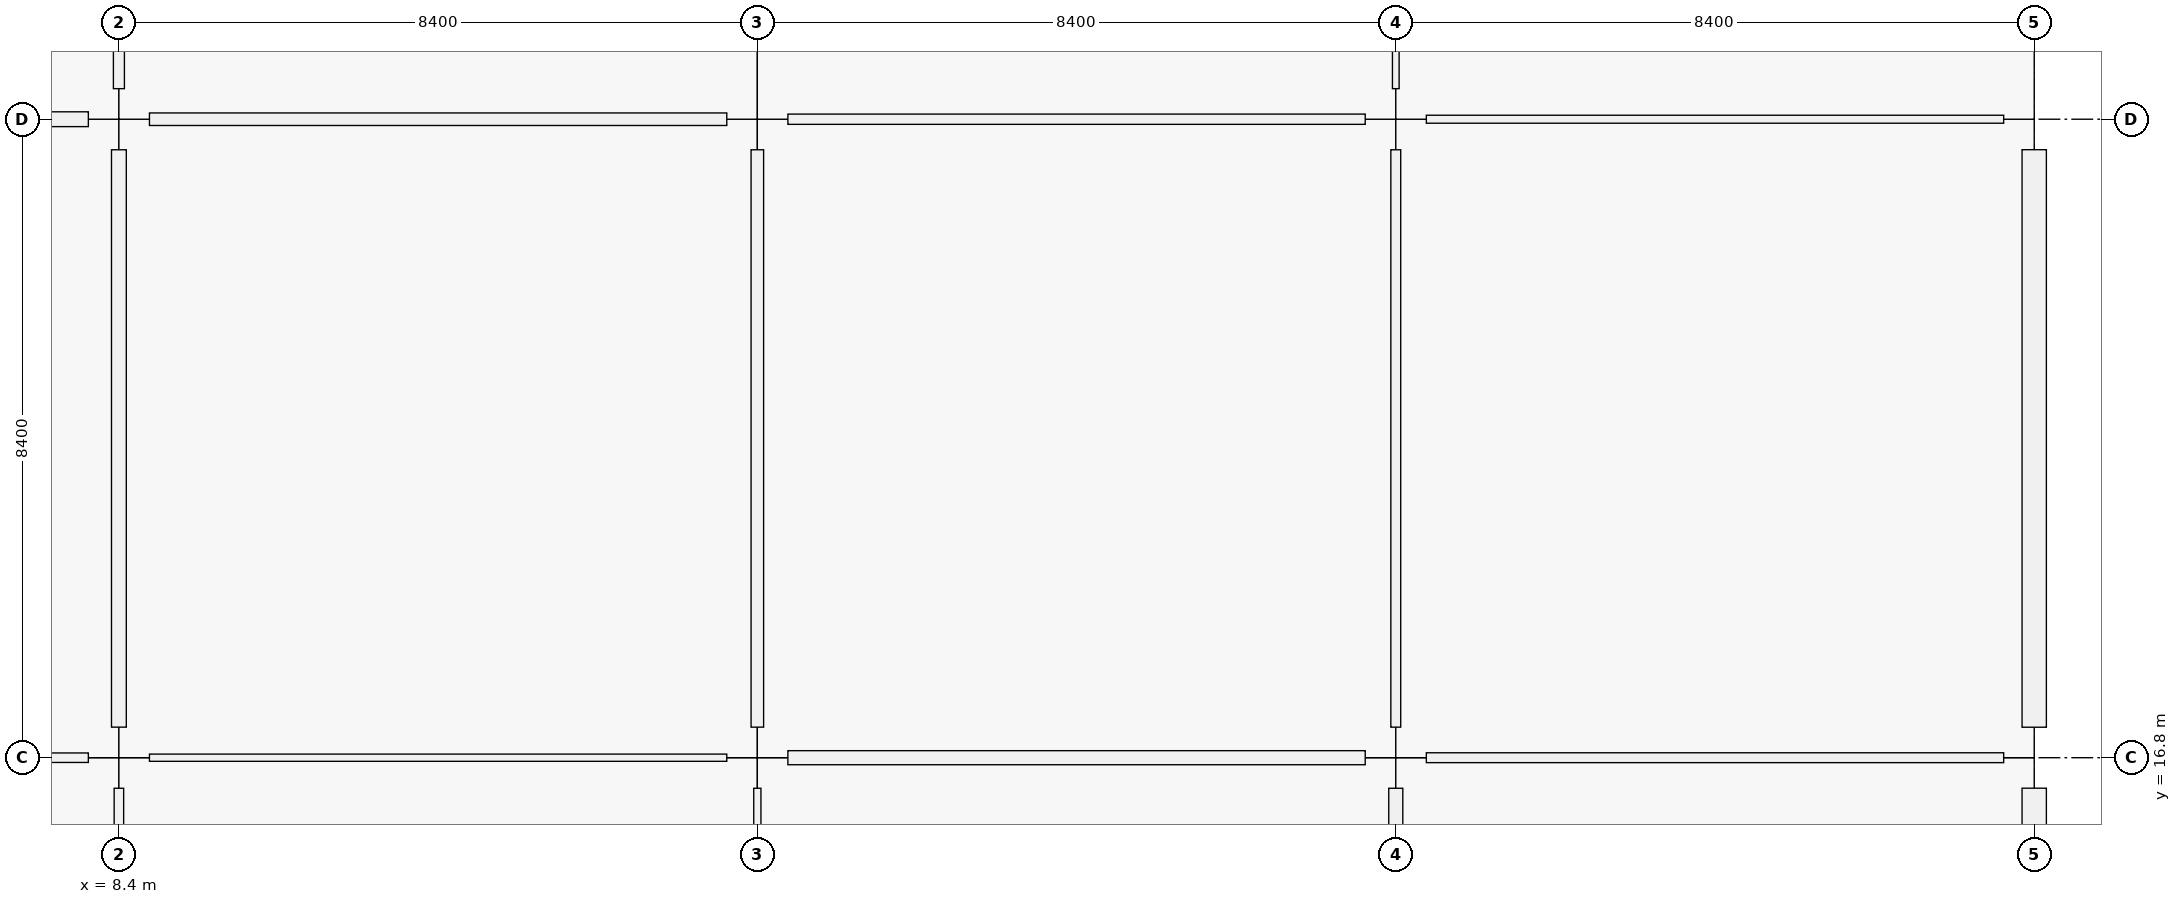
"""IFC4 building model, lengths in metres.
Left out: names, types, materials, properties, quantities, classifications, styles, units other than length and angle.
Written with IfcOpenShell. Run it as: python <this file> out.ifc"""

import sys

from ifc_helpers import new_model, si_unit, direction, frame, frame_2d, origin, origin_2d, place, context, subcontext, project, spatial, rectangle, extrude, element, fill, save


model = new_model("IFC4")
c1 = context("Model", 3, precision=1e-05, world=origin(), true_north=direction((0.0, 1.0)))
c2 = subcontext(c1, "Body", "Model", "MODEL_VIEW")
j1 = project(units=[si_unit("LENGTHUNIT", "METRE"), si_unit("PLANEANGLEUNIT", "RADIAN")], contexts=[c1])
p1 = place(None, origin())
s1 = spatial("IfcSite", under=j1, at=p1, CompositionType="ELEMENT")
p2 = place(p1, origin())
s2 = spatial("IfcBuilding", under=s1, at=p2, CompositionType="ELEMENT")
p3 = place(p2, frame((0.0, 0.0, 5.76)))
s3 = spatial("IfcBuildingStorey", under=s2, at=p3, CompositionType="ELEMENT", Elevation=5.76)
for number, where, z_axis, x_axis in (
    (1, (8.4, 16.8, 0.0), (0.0, 0.0, 1.0), (1.0, 0.0, 0.0)),
    (2, (8.4, 25.2, 0.0), (0.0, 0.0, 1.0), (1.0, 0.0, 0.0)),
    (3, (16.8, 16.8, 0.0), (0.0, 0.0, 1.0), (1.0, 0.0, 0.0)),
    (4, (16.8, 25.2, 0.0), (0.0, 0.0, 1.0), (1.0, 0.0, 0.0)),
    (5, (25.2, 16.8, 0.0), (0.0, 0.0, 1.0), (1.0, 0.0, 0.0)),
    (6, (25.2, 25.2, 0.0), (0.0, 0.0, 1.0), (1.0, 0.0, 0.0)),
    (7, (33.6, 16.8, 0.0), (0.0, 0.0, 1.0), (1.0, 0.0, 0.0)),
    (8, (33.6, 25.2, 0.0), (0.0, 0.0, 1.0), (1.0, 0.0, 0.0)),
):
    element("IfcColumn", number, at=place(p3, frame(where, z_axis=z_axis, x_axis=x_axis)), inside=s3, PredefinedType="COLUMN", context=c2, shape_type="SweptSolid", body=[
        extrude(rectangle(XDim=0.8, YDim=0.8, at=origin_2d()), origin(), (0.0, 0.0, 1.0), 4.5),
    ])
p4 = place(p3, frame((33.6, 16.399, 0.0), z_axis=(0.0, 0.0, 1.0), x_axis=(0.0, -1.0, 0.0)))
e9 = element("IfcWall", 9, at=p4, inside=s3, PredefinedType="SOLIDWALL", context=c2, shape_type="SweptSolid", body=[
    extrude(rectangle(XDim=7.698, YDim=0.32, at=frame_2d((3.849, 0.0))), origin(), (0.0, 0.0, 1.0), 3.4),
])
p5 = place(p4, frame((2.699, 0.0, 0.9)))
e10 = element("IfcOpeningElement", 10, at=p5, cuts=e9, PredefinedType="OPENING", context=c2, shape_type="SweptSolid", body=[
    extrude(rectangle(XDim=2.3, YDim=1.85, at=frame_2d((1.15, 0.925))), frame((0.0, 0.16, 0.0), z_axis=(0.0, -1.0, 0.0), x_axis=(1.0, 0.0, 0.0)), (0.0, 0.0, 1.0), 0.32),
])
p6 = place(p3, frame((33.6, 24.799, 0.0), z_axis=(0.0, 0.0, 1.0), x_axis=(0.0, -1.0, 0.0)))
e11 = element("IfcWall", 11, at=p6, inside=s3, PredefinedType="SOLIDWALL", context=c2, shape_type="SweptSolid", body=[
    extrude(rectangle(XDim=7.598, YDim=0.32, at=frame_2d((3.799, 0.0))), origin(), (0.0, 0.0, 1.0), 3.4),
])
p7 = place(p6, frame((2.349, 0.0, 0.9)))
e12 = element("IfcOpeningElement", 12, at=p7, cuts=e11, PredefinedType="OPENING", context=c2, shape_type="SweptSolid", body=[
    extrude(rectangle(XDim=2.9, YDim=1.85, at=frame_2d((1.45, 0.925))), frame((0.0, 0.16, 0.0), z_axis=(0.0, -1.0, 0.0), x_axis=(1.0, 0.0, 0.0)), (0.0, 0.0, 1.0), 0.32),
])
p8 = place(p3, frame((0.277, 16.8, 0.0), z_axis=(0.0, 0.0, 1.0), x_axis=(1.0, 0.0, 0.0)))
e13 = element("IfcWall", 13, at=p8, inside=s3, PredefinedType="PARTITIONING", context=c2, shape_type="SweptSolid", body=[
    extrude(rectangle(XDim=7.721, YDim=0.125, at=frame_2d((3.86, 0.0))), origin(), (0.0, 0.0, 1.0), 2.4),
])
p9 = place(p8, frame((3.33, 0.0, 0.0)))
e14 = element("IfcOpeningElement", 14, at=p9, cuts=e13, PredefinedType="OPENING", context=c2, shape_type="SweptSolid", body=[
    extrude(rectangle(XDim=1.06, YDim=2.22, at=frame_2d((0.53, 1.11))), frame((0.0, 0.062, 0.0), z_axis=(0.0, -1.0, 0.0), x_axis=(1.0, 0.0, 0.0)), (0.0, 0.0, 1.0), 0.125),
])
p10 = place(p3, frame((0.277, 25.2, 0.0), z_axis=(0.0, 0.0, 1.0), x_axis=(1.0, 0.0, 0.0)))
e15 = element("IfcWall", 15, at=p10, inside=s3, PredefinedType="PARTITIONING", context=c2, shape_type="SweptSolid", body=[
    extrude(rectangle(XDim=7.721, YDim=0.195, at=frame_2d((3.86, 0.0))), origin(), (0.0, 0.0, 1.0), 2.4),
])
p11 = place(p10, frame((3.396, 0.0, 0.0)))
e16 = element("IfcOpeningElement", 16, at=p11, cuts=e15, PredefinedType="OPENING", context=c2, shape_type="SweptSolid", body=[
    extrude(rectangle(XDim=0.93, YDim=2.12, at=frame_2d((0.465, 1.06))), frame((0.0, 0.098, 0.0), z_axis=(0.0, -1.0, 0.0), x_axis=(1.0, 0.0, 0.0)), (0.0, 0.0, 1.0), 0.195),
])
p12 = place(p3, frame((8.802, 16.8, 0.0), z_axis=(0.0, 0.0, 1.0), x_axis=(1.0, 0.0, 0.0)))
e17 = element("IfcWall", 17, at=p12, inside=s3, PredefinedType="PARTITIONING", context=c2, shape_type="SweptSolid", body=[
    extrude(rectangle(XDim=7.596, YDim=0.095, at=frame_2d((3.798, 0.0))), origin(), (0.0, 0.0, 1.0), 2.4),
])
p13 = place(p12, frame((3.258, 0.0, 0.0)))
e18 = element("IfcOpeningElement", 18, at=p13, cuts=e17, PredefinedType="OPENING", context=c2, shape_type="SweptSolid", body=[
    extrude(rectangle(XDim=1.08, YDim=2.22, at=frame_2d((0.54, 1.11))), frame((0.0, 0.047, 0.0), z_axis=(0.0, -1.0, 0.0), x_axis=(1.0, 0.0, 0.0)), (0.0, 0.0, 1.0), 0.095),
])
p14 = place(p3, frame((8.802, 25.2, 0.0), z_axis=(0.0, 0.0, 1.0), x_axis=(1.0, 0.0, 0.0)))
e19 = element("IfcWall", 19, at=p14, inside=s3, PredefinedType="PARTITIONING", context=c2, shape_type="SweptSolid", body=[
    extrude(rectangle(XDim=7.596, YDim=0.165, at=frame_2d((3.798, 0.0))), origin(), (0.0, 0.0, 1.0), 2.4),
])
p15 = place(p14, frame((3.318, 0.0, 0.0)))
e20 = element("IfcOpeningElement", 20, at=p15, cuts=e19, PredefinedType="OPENING", context=c2, shape_type="SweptSolid", body=[
    extrude(rectangle(XDim=0.96, YDim=2.18, at=frame_2d((0.48, 1.09))), frame((0.0, 0.083, 0.0), z_axis=(0.0, -1.0, 0.0), x_axis=(1.0, 0.0, 0.0)), (0.0, 0.0, 1.0), 0.165),
])
p16 = place(p3, frame((17.202, 16.8, 0.0), z_axis=(0.0, 0.0, 1.0), x_axis=(1.0, 0.0, 0.0)))
e21 = element("IfcWall", 21, at=p16, inside=s3, PredefinedType="PARTITIONING", context=c2, shape_type="SweptSolid", body=[
    extrude(rectangle(XDim=7.596, YDim=0.185, at=frame_2d((3.798, 0.0))), origin(), (0.0, 0.0, 1.0), 2.4),
])
p17 = place(p16, frame((3.268, 0.0, 0.0)))
e22 = element("IfcOpeningElement", 22, at=p17, cuts=e21, PredefinedType="OPENING", context=c2, shape_type="SweptSolid", body=[
    extrude(rectangle(XDim=1.06, YDim=2.22, at=frame_2d((0.53, 1.11))), frame((0.0, 0.093, 0.0), z_axis=(0.0, -1.0, 0.0), x_axis=(1.0, 0.0, 0.0)), (0.0, 0.0, 1.0), 0.185),
])
p18 = place(p3, frame((17.202, 25.2, 0.0), z_axis=(0.0, 0.0, 1.0), x_axis=(1.0, 0.0, 0.0)))
e23 = element("IfcWall", 23, at=p18, inside=s3, PredefinedType="PARTITIONING", context=c2, shape_type="SweptSolid", body=[
    extrude(rectangle(XDim=7.596, YDim=0.135, at=frame_2d((3.798, 0.0))), origin(), (0.0, 0.0, 1.0), 2.4),
])
p19 = place(p18, frame((3.338, 0.0, 0.0)))
e24 = element("IfcOpeningElement", 24, at=p19, cuts=e23, PredefinedType="OPENING", context=c2, shape_type="SweptSolid", body=[
    extrude(rectangle(XDim=0.92, YDim=2.15, at=frame_2d((0.46, 1.075))), frame((0.0, 0.067, 0.0), z_axis=(0.0, -1.0, 0.0), x_axis=(1.0, 0.0, 0.0)), (0.0, 0.0, 1.0), 0.135),
])
p20 = place(p3, frame((25.602, 16.8, 0.0), z_axis=(0.0, 0.0, 1.0), x_axis=(1.0, 0.0, 0.0)))
e25 = element("IfcWall", 25, at=p20, inside=s3, PredefinedType="MOVABLE", context=c2, shape_type="SweptSolid", body=[
    extrude(rectangle(XDim=7.596, YDim=0.13, at=frame_2d((3.798, 0.0))), origin(), (0.0, 0.0, 1.0), 2.4),
])
p21 = place(p20, frame((3.313, 0.0, 0.0)))
e26 = element("IfcOpeningElement", 26, at=p21, cuts=e25, PredefinedType="OPENING", context=c2, shape_type="SweptSolid", body=[
    extrude(rectangle(XDim=0.97, YDim=2.12, at=frame_2d((0.485, 1.06))), frame((0.0, 0.065, 0.0), z_axis=(0.0, -1.0, 0.0), x_axis=(1.0, 0.0, 0.0)), (0.0, 0.0, 1.0), 0.13),
])
p22 = place(p3, frame((25.602, 25.2, 0.0), z_axis=(0.0, 0.0, 1.0), x_axis=(1.0, 0.0, 0.0)))
e27 = element("IfcWall", 27, at=p22, inside=s3, PredefinedType="PARTITIONING", context=c2, shape_type="SweptSolid", body=[
    extrude(rectangle(XDim=7.596, YDim=0.105, at=frame_2d((3.798, 0.0))), origin(), (0.0, 0.0, 1.0), 2.4),
])
p23 = place(p22, frame((3.278, 0.0, 0.0)))
e28 = element("IfcOpeningElement", 28, at=p23, cuts=e27, PredefinedType="OPENING", context=c2, shape_type="SweptSolid", body=[
    extrude(rectangle(XDim=1.04, YDim=2.2, at=frame_2d((0.52, 1.1))), frame((0.0, 0.052, 0.0), z_axis=(0.0, -1.0, 0.0), x_axis=(1.0, 0.0, 0.0)), (0.0, 0.0, 1.0), 0.105),
])
p24 = place(p3, frame((8.4, 8.727, 0.0), z_axis=(0.0, 0.0, 1.0), x_axis=(0.0, 1.0, 0.0)))
e29 = element("IfcWall", 29, at=p24, inside=s3, PredefinedType="PARTITIONING", context=c2, shape_type="SweptSolid", body=[
    extrude(rectangle(XDim=7.671, YDim=0.125, at=frame_2d((3.835, 0.0))), origin(), (0.0, 0.0, 1.0), 2.4),
])
p25 = place(p24, frame((3.336, 0.0, 0.0)))
e30 = element("IfcOpeningElement", 30, at=p25, cuts=e29, PredefinedType="OPENING", context=c2, shape_type="SweptSolid", body=[
    extrude(rectangle(XDim=1.0, YDim=2.2, at=frame_2d((0.5, 1.1))), frame((0.0, 0.062, 0.0), z_axis=(0.0, -1.0, 0.0), x_axis=(1.0, 0.0, 0.0)), (0.0, 0.0, 1.0), 0.125),
])
p26 = place(p3, frame((8.4, 17.202, 0.0), z_axis=(0.0, 0.0, 1.0), x_axis=(0.0, 1.0, 0.0)))
e31 = element("IfcWall", 31, at=p26, inside=s3, PredefinedType="PARTITIONING", context=c2, shape_type="SweptSolid", body=[
    extrude(rectangle(XDim=7.596, YDim=0.195, at=frame_2d((3.798, 0.0))), origin(), (0.0, 0.0, 1.0), 2.4),
])
p27 = place(p26, frame((3.308, 0.0, 0.0)))
e32 = element("IfcOpeningElement", 32, at=p27, cuts=e31, PredefinedType="OPENING", context=c2, shape_type="SweptSolid", body=[
    extrude(rectangle(XDim=0.98, YDim=2.18, at=frame_2d((0.49, 1.09))), frame((0.0, 0.098, 0.0), z_axis=(0.0, -1.0, 0.0), x_axis=(1.0, 0.0, 0.0)), (0.0, 0.0, 1.0), 0.195),
])
p28 = place(p3, frame((8.4, 25.602, 0.0), z_axis=(0.0, 0.0, 1.0), x_axis=(0.0, 1.0, 0.0)))
e33 = element("IfcWall", 33, at=p28, inside=s3, PredefinedType="PARTITIONING", context=c2, shape_type="SweptSolid", body=[
    extrude(rectangle(XDim=7.596, YDim=0.145, at=frame_2d((3.798, 0.0))), origin(), (0.0, 0.0, 1.0), 2.4),
])
p29 = place(p28, frame((3.313, 0.0, 0.0)))
e34 = element("IfcOpeningElement", 34, at=p29, cuts=e33, PredefinedType="OPENING", context=c2, shape_type="SweptSolid", body=[
    extrude(rectangle(XDim=0.97, YDim=2.12, at=frame_2d((0.485, 1.06))), frame((0.0, 0.073, 0.0), z_axis=(0.0, -1.0, 0.0), x_axis=(1.0, 0.0, 0.0)), (0.0, 0.0, 1.0), 0.145),
])
p30 = place(p3, frame((16.8, 8.702, 0.0), z_axis=(0.0, 0.0, 1.0), x_axis=(0.0, 1.0, 0.0)))
e35 = element("IfcWall", 35, at=p30, inside=s3, PredefinedType="PARTITIONING", context=c2, shape_type="SweptSolid", body=[
    extrude(rectangle(XDim=7.696, YDim=0.095, at=frame_2d((3.848, 0.0))), origin(), (0.0, 0.0, 1.0), 2.4),
])
p31 = place(p30, frame((3.323, 0.0, 0.0)))
e36 = element("IfcOpeningElement", 36, at=p31, cuts=e35, PredefinedType="OPENING", context=c2, shape_type="SweptSolid", body=[
    extrude(rectangle(XDim=1.05, YDim=2.12, at=frame_2d((0.525, 1.06))), frame((0.0, 0.047, 0.0), z_axis=(0.0, -1.0, 0.0), x_axis=(1.0, 0.0, 0.0)), (0.0, 0.0, 1.0), 0.095),
])
p32 = place(p3, frame((16.8, 17.202, 0.0), z_axis=(0.0, 0.0, 1.0), x_axis=(0.0, 1.0, 0.0)))
e37 = element("IfcWall", 37, at=p32, inside=s3, PredefinedType="PARTITIONING", context=c2, shape_type="SweptSolid", body=[
    extrude(rectangle(XDim=7.596, YDim=0.165, at=frame_2d((3.798, 0.0))), origin(), (0.0, 0.0, 1.0), 2.4),
])
p33 = place(p32, frame((3.293, 0.0, 0.0)))
e38 = element("IfcOpeningElement", 38, at=p33, cuts=e37, PredefinedType="OPENING", context=c2, shape_type="SweptSolid", body=[
    extrude(rectangle(XDim=1.01, YDim=2.12, at=frame_2d((0.505, 1.06))), frame((0.0, 0.083, 0.0), z_axis=(0.0, -1.0, 0.0), x_axis=(1.0, 0.0, 0.0)), (0.0, 0.0, 1.0), 0.165),
])
p34 = place(p3, frame((25.2, 8.727, 0.0), z_axis=(0.0, 0.0, 1.0), x_axis=(0.0, 1.0, 0.0)))
e39 = element("IfcWall", 39, at=p34, inside=s3, PredefinedType="PARTITIONING", context=c2, shape_type="SweptSolid", body=[
    extrude(rectangle(XDim=7.671, YDim=0.185, at=frame_2d((3.835, 0.0))), origin(), (0.0, 0.0, 1.0), 2.4),
])
p35 = place(p34, frame((3.306, 0.0, 0.0)))
e40 = element("IfcOpeningElement", 40, at=p35, cuts=e39, PredefinedType="OPENING", context=c2, shape_type="SweptSolid", body=[
    extrude(rectangle(XDim=1.06, YDim=2.22, at=frame_2d((0.53, 1.11))), frame((0.0, 0.093, 0.0), z_axis=(0.0, -1.0, 0.0), x_axis=(1.0, 0.0, 0.0)), (0.0, 0.0, 1.0), 0.185),
])
p36 = place(p3, frame((25.2, 17.202, 0.0), z_axis=(0.0, 0.0, 1.0), x_axis=(0.0, 1.0, 0.0)))
e41 = element("IfcWall", 41, at=p36, inside=s3, PredefinedType="MOVABLE", context=c2, shape_type="SweptSolid", body=[
    extrude(rectangle(XDim=7.596, YDim=0.13, at=frame_2d((3.798, 0.0))), origin(), (0.0, 0.0, 1.0), 2.4),
])
p37 = place(p36, frame((3.278, 0.0, 0.0)))
e42 = element("IfcOpeningElement", 42, at=p37, cuts=e41, PredefinedType="OPENING", context=c2, shape_type="SweptSolid", body=[
    extrude(rectangle(XDim=1.04, YDim=2.2, at=frame_2d((0.52, 1.1))), frame((0.0, 0.065, 0.0), z_axis=(0.0, -1.0, 0.0), x_axis=(1.0, 0.0, 0.0)), (0.0, 0.0, 1.0), 0.13),
])
p38 = place(p3, frame((25.2, 25.602, 0.0), z_axis=(0.0, 0.0, 1.0), x_axis=(0.0, 1.0, 0.0)))
e43 = element("IfcWall", 43, at=p38, inside=s3, PredefinedType="PARTITIONING", context=c2, shape_type="SweptSolid", body=[
    extrude(rectangle(XDim=7.596, YDim=0.088, at=frame_2d((3.798, 0.0))), origin(), (0.0, 0.0, 1.0), 2.4),
])
p39 = place(p38, frame((3.268, 0.0, 0.0)))
e44 = element("IfcOpeningElement", 44, at=p39, cuts=e43, PredefinedType="OPENING", context=c2, shape_type="SweptSolid", body=[
    extrude(rectangle(XDim=1.06, YDim=2.22, at=frame_2d((0.53, 1.11))), frame((0.0, 0.044, 0.0), z_axis=(0.0, -1.0, 0.0), x_axis=(1.0, 0.0, 0.0)), (0.0, 0.0, 1.0), 0.088),
])
p40 = place(p7, origin())
e45 = element("IfcWindow", 45, at=p40, inside=s3, PartitioningType="SINGLE_PANEL", PredefinedType="WINDOW", context=c2, shape_type="SweptSolid", body=[
    extrude(rectangle(XDim=2.9, YDim=1.85, at=frame_2d((1.45, 0.925))), frame((0.0, 0.03, 0.0), z_axis=(0.0, -1.0, 0.0), x_axis=(1.0, 0.0, 0.0)), (0.0, 0.0, 1.0), 0.06),
])
fill(e12, e45)
p41 = place(p15, origin())
e46 = element("IfcDoor", 46, at=p41, inside=s3, OperationType="SINGLE_SWING_RIGHT", PredefinedType="DOOR", context=c2, shape_type="SweptSolid", body=[
    extrude(rectangle(XDim=0.96, YDim=2.18, at=frame_2d((0.48, 1.09))), frame((0.0, 0.025, 0.0), z_axis=(0.0, -1.0, 0.0), x_axis=(1.0, 0.0, 0.0)), (0.0, 0.0, 1.0), 0.05),
])
fill(e20, e46)
p42 = place(p19, origin())
e47 = element("IfcDoor", 47, at=p42, inside=s3, OperationType="SINGLE_SWING_RIGHT", PredefinedType="DOOR", context=c2, shape_type="SweptSolid", body=[
    extrude(rectangle(XDim=0.92, YDim=2.15, at=frame_2d((0.46, 1.075))), frame((0.0, 0.025, 0.0), z_axis=(0.0, -1.0, 0.0), x_axis=(1.0, 0.0, 0.0)), (0.0, 0.0, 1.0), 0.05),
])
fill(e24, e47)
p43 = place(p21, origin())
e48 = element("IfcDoor", 48, at=p43, inside=s3, OperationType="SINGLE_SWING_RIGHT", PredefinedType="DOOR", context=c2, shape_type="SweptSolid", body=[
    extrude(rectangle(XDim=0.97, YDim=2.12, at=frame_2d((0.485, 1.06))), frame((0.0, 0.025, 0.0), z_axis=(0.0, -1.0, 0.0), x_axis=(1.0, 0.0, 0.0)), (0.0, 0.0, 1.0), 0.05),
])
fill(e26, e48)
p44 = place(p13, origin())
e49 = element("IfcDoor", 49, at=p44, inside=s3, OperationType="SINGLE_SWING_RIGHT", PredefinedType="DOOR", context=c2, shape_type="SweptSolid", body=[
    extrude(rectangle(XDim=1.08, YDim=2.22, at=frame_2d((0.54, 1.11))), frame((0.0, 0.025, 0.0), z_axis=(0.0, -1.0, 0.0), x_axis=(1.0, 0.0, 0.0)), (0.0, 0.0, 1.0), 0.05),
])
fill(e18, e49)
p45 = place(p17, origin())
e50 = element("IfcDoor", 50, at=p45, inside=s3, OperationType="SINGLE_SWING_LEFT", PredefinedType="DOOR", context=c2, shape_type="SweptSolid", body=[
    extrude(rectangle(XDim=1.06, YDim=2.22, at=frame_2d((0.53, 1.11))), frame((0.0, 0.025, 0.0), z_axis=(0.0, -1.0, 0.0), x_axis=(1.0, 0.0, 0.0)), (0.0, 0.0, 1.0), 0.05),
])
fill(e22, e50)
p46 = place(p23, origin())
e51 = element("IfcDoor", 51, at=p46, inside=s3, OperationType="SINGLE_SWING_RIGHT", PredefinedType="DOOR", context=c2, shape_type="SweptSolid", body=[
    extrude(rectangle(XDim=1.04, YDim=2.2, at=frame_2d((0.52, 1.1))), frame((0.0, 0.025, 0.0), z_axis=(0.0, -1.0, 0.0), x_axis=(1.0, 0.0, 0.0)), (0.0, 0.0, 1.0), 0.05),
])
fill(e28, e51)
p47 = place(p27, origin())
e52 = element("IfcDoor", 52, at=p47, inside=s3, OperationType="SINGLE_SWING_RIGHT", PredefinedType="DOOR", context=c2, shape_type="SweptSolid", body=[
    extrude(rectangle(XDim=0.98, YDim=2.18, at=frame_2d((0.49, 1.09))), frame((0.0, 0.025, 0.0), z_axis=(0.0, -1.0, 0.0), x_axis=(1.0, 0.0, 0.0)), (0.0, 0.0, 1.0), 0.05),
])
fill(e32, e52)
p48 = place(p33, origin())
e53 = element("IfcDoor", 53, at=p48, inside=s3, OperationType="SINGLE_SWING_LEFT", PredefinedType="DOOR", context=c2, shape_type="SweptSolid", body=[
    extrude(rectangle(XDim=1.01, YDim=2.12, at=frame_2d((0.505, 1.06))), frame((0.0, 0.025, 0.0), z_axis=(0.0, -1.0, 0.0), x_axis=(1.0, 0.0, 0.0)), (0.0, 0.0, 1.0), 0.05),
])
fill(e38, e53)
p49 = place(p37, origin())
e54 = element("IfcDoor", 54, at=p49, inside=s3, OperationType="SINGLE_SWING_RIGHT", PredefinedType="DOOR", context=c2, shape_type="SweptSolid", body=[
    extrude(rectangle(XDim=1.04, YDim=2.2, at=frame_2d((0.52, 1.1))), frame((0.0, 0.025, 0.0), z_axis=(0.0, -1.0, 0.0), x_axis=(1.0, 0.0, 0.0)), (0.0, 0.0, 1.0), 0.05),
])
fill(e42, e54)
save(model, sys.argv[1])
